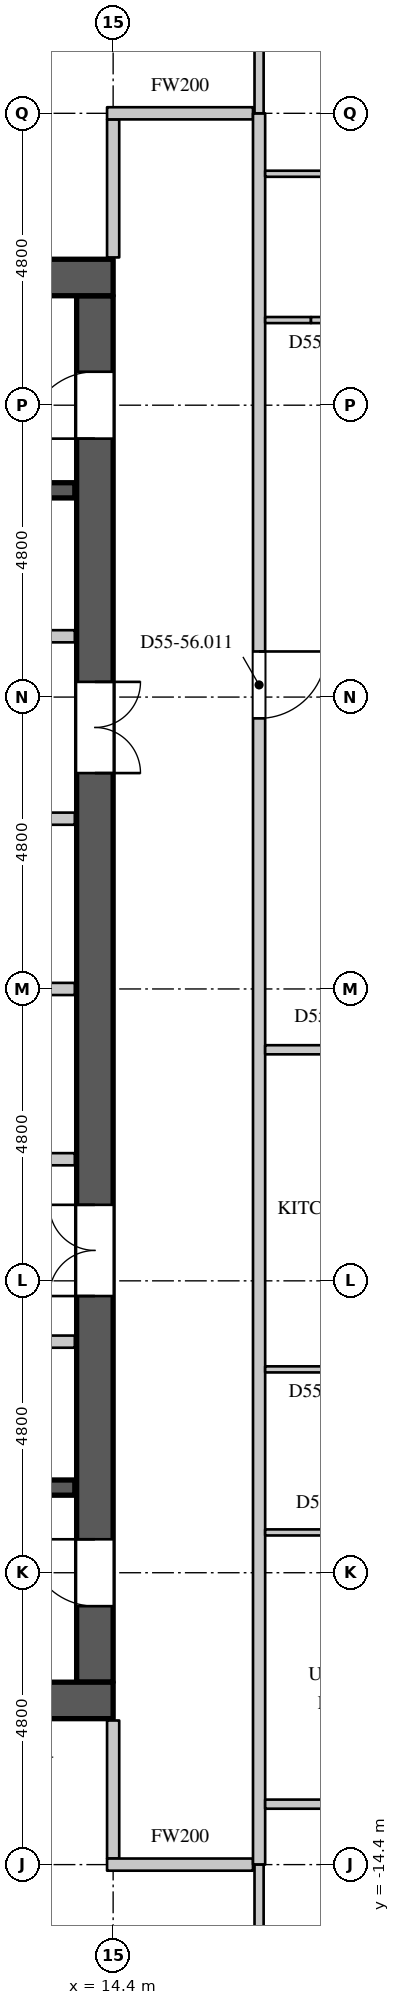
"""IFC4 building model, lengths in metres.
Left out: names, types, materials, properties, quantities, classifications, styles, units other than length and angle.
Written with IfcOpenShell. Run it as: python <this file> out.ifc"""

import sys

from ifc_helpers import new_model, si_unit, direction, frame, frame_2d, origin, place, context, subcontext, project, spatial, rectangle, extrude, element, fill, save


model = new_model("IFC4")
c1 = context("Model", 3, precision=1e-05, world=origin(), true_north=direction((0.0, 1.0)))
c2 = subcontext(c1, "Body", "Model", "MODEL_VIEW")
j1 = project(units=[si_unit("LENGTHUNIT", "METRE"), si_unit("PLANEANGLEUNIT", "RADIAN")], contexts=[c1])
p1 = place(None, origin())
s1 = spatial("IfcSite", under=j1, at=p1, CompositionType="ELEMENT")
p2 = place(p1, origin())
s2 = spatial("IfcBuilding", under=s1, at=p2, CompositionType="ELEMENT")
p3 = place(p2, frame((0.0, 0.0, 239.1)))
s3 = spatial("IfcBuildingStorey", under=s2, at=p3, CompositionType="ELEMENT", Elevation=239.1)
for number, where, z_axis, x_axis in (
    (1, (-14.4, 11.7, 0.0), (0.0, 0.0, 1.0), (1.0, 0.0, 0.0)),
    (2, (-14.4, -11.7, 0.0), (0.0, 0.0, 1.0), (1.0, 0.0, 0.0)),
):
    element("IfcWall", number, at=place(p3, frame(where, z_axis=z_axis, x_axis=x_axis)), inside=s3, PredefinedType="SHEAR", context=c2, shape_type="SweptSolid", body=[
        extrude(rectangle(XDim=28.8, YDim=0.6, at=frame_2d((14.4, 0.0))), origin(), (0.0, 0.0, 1.0), 4.2),
    ])
p4 = place(p3, frame((14.1, -11.4, 0.0), z_axis=(0.0, 0.0, 1.0), x_axis=(0.0, 1.0, 0.0)))
e3 = element("IfcWall", 3, at=p4, inside=s3, PredefinedType="SHEAR", context=c2, shape_type="SweptSolid", body=[
    extrude(rectangle(XDim=22.8, YDim=0.6, at=frame_2d((11.4, 0.0))), origin(), (0.0, 0.0, 1.0), 4.2),
])
p5 = place(p4, frame((20.45, 0.0, 0.0)))
e4 = element("IfcOpeningElement", 4, at=p5, cuts=e3, PredefinedType="OPENING", context=c2, shape_type="SweptSolid", body=[
    extrude(rectangle(XDim=1.1, YDim=2.2, at=frame_2d((0.55, 1.1))), frame((0.0, 0.31, 0.0), z_axis=(0.0, -1.0, 0.0), x_axis=(1.0, 0.0, 0.0)), (0.0, 0.0, 1.0), 0.62),
])
p6 = place(p4, frame((1.25, 0.0, 0.0)))
e5 = element("IfcOpeningElement", 5, at=p6, cuts=e3, PredefinedType="OPENING", context=c2, shape_type="SweptSolid", body=[
    extrude(rectangle(XDim=1.1, YDim=2.2, at=frame_2d((0.55, 1.1))), frame((0.0, 0.31, 0.0), z_axis=(0.0, -1.0, 0.0), x_axis=(1.0, 0.0, 0.0)), (0.0, 0.0, 1.0), 0.62),
])
p7 = place(p4, frame((14.95, 0.0, 0.0)))
e6 = element("IfcOpeningElement", 6, at=p7, cuts=e3, PredefinedType="OPENING", context=c2, shape_type="SweptSolid", body=[
    extrude(rectangle(XDim=1.5, YDim=2.4, at=frame_2d((0.75, 1.2))), frame((0.0, 0.31, 0.0), z_axis=(0.0, -1.0, 0.0), x_axis=(1.0, 0.0, 0.0)), (0.0, 0.0, 1.0), 0.62),
])
p8 = place(p4, frame((6.35, 0.0, 0.0)))
e7 = element("IfcOpeningElement", 7, at=p8, cuts=e3, PredefinedType="OPENING", context=c2, shape_type="SweptSolid", body=[
    extrude(rectangle(XDim=1.5, YDim=2.4, at=frame_2d((0.75, 1.2))), frame((0.0, 0.31, 0.0), z_axis=(0.0, -1.0, 0.0), x_axis=(1.0, 0.0, 0.0)), (0.0, 0.0, 1.0), 0.62),
])
p9 = place(p3, frame((9.22, 5.8, 0.0), z_axis=(0.0, 0.0, 1.0), x_axis=(1.0, 0.0, 0.0)))
e8 = element("IfcWall", 8, at=p9, inside=s3, PredefinedType="PARTITIONING", context=c2, shape_type="SweptSolid", body=[
    extrude(rectangle(XDim=4.55, YDim=0.2, at=frame_2d((2.275, 0.0))), origin(), (0.0, 0.0, 1.0), 3.95),
])
p10 = place(p9, frame((1.8, 0.0, 0.0)))
e9 = element("IfcOpeningElement", 9, at=p10, cuts=e8, PredefinedType="OPENING", context=c2, shape_type="SweptSolid", body=[
    extrude(rectangle(XDim=0.9, YDim=2.2, at=frame_2d((0.45, 1.1))), frame((0.0, 0.11, 0.0), z_axis=(0.0, -1.0, 0.0), x_axis=(1.0, 0.0, 0.0)), (0.0, 0.0, 1.0), 0.22),
])
p11 = place(p3, frame((14.4, -14.3, 0.0), z_axis=(0.0, 0.0, 1.0), x_axis=(0.0, 1.0, 0.0)))
e10 = element("IfcWall", 10, at=p11, inside=s3, PredefinedType="PARTITIONING", context=c2, shape_type="SweptSolid", body=[
    extrude(rectangle(XDim=2.27, YDim=0.2, at=frame_2d((1.135, 0.0))), origin(), (0.0, 0.0, 1.0), 3.95),
])
p12 = place(p3, frame((14.3, -14.4, 0.0), z_axis=(0.0, 0.0, 1.0), x_axis=(1.0, 0.0, 0.0)))
e11 = element("IfcWall", 11, at=p12, inside=s3, PredefinedType="PARTITIONING", context=c2, shape_type="SweptSolid", body=[
    extrude(rectangle(XDim=2.4, YDim=0.2, at=frame_2d((1.2, 0.0))), origin(), (0.0, 0.0, 1.0), 3.95),
])
p13 = place(p3, frame((14.4, 12.03, 0.0), z_axis=(0.0, 0.0, 1.0), x_axis=(0.0, 1.0, 0.0)))
e12 = element("IfcWall", 12, at=p13, inside=s3, PredefinedType="PARTITIONING", context=c2, shape_type="SweptSolid", body=[
    extrude(rectangle(XDim=2.27, YDim=0.2, at=frame_2d((1.135, 0.0))), origin(), (0.0, 0.0, 1.0), 3.95),
])
p14 = place(p3, frame((14.3, 14.4, 0.0), z_axis=(0.0, 0.0, 1.0), x_axis=(1.0, 0.0, 0.0)))
e13 = element("IfcWall", 13, at=p14, inside=s3, PredefinedType="PARTITIONING", context=c2, shape_type="SweptSolid", body=[
    extrude(rectangle(XDim=2.4, YDim=0.2, at=frame_2d((1.2, 0.0))), origin(), (0.0, 0.0, 1.0), 3.95),
])
p15 = place(p3, frame((16.8, -14.4, 0.0), z_axis=(0.0, 0.0, 1.0), x_axis=(0.0, 1.0, 0.0)))
e14 = element("IfcWall", 14, at=p15, inside=s3, PredefinedType="PARTITIONING", context=c2, shape_type="SweptSolid", body=[
    extrude(rectangle(XDim=28.8, YDim=0.2, at=frame_2d((14.4, 0.0))), origin(), (0.0, 0.0, 1.0), 3.95),
])
p16 = place(p15, frame((18.85, 0.0, 0.0)))
e15 = element("IfcOpeningElement", 15, at=p16, cuts=e14, PredefinedType="OPENING", context=c2, shape_type="SweptSolid", body=[
    extrude(rectangle(XDim=1.1, YDim=2.4, at=frame_2d((0.55, 1.2))), frame((0.0, 0.11, 0.0), z_axis=(0.0, -1.0, 0.0), x_axis=(1.0, 0.0, 0.0)), (0.0, 0.0, 1.0), 0.22),
])
p17 = place(p3, frame((16.8, -19.828, 0.0), z_axis=(0.0, 0.0, 1.0), x_axis=(0.0, 1.0, 0.0)))
e16 = element("IfcWall", 16, at=p17, inside=s3, PredefinedType="PARTITIONING", context=c2, shape_type="SweptSolid", body=[
    extrude(rectangle(XDim=5.428, YDim=0.15, at=frame_2d((2.714, 0.0))), origin(), (0.0, 0.0, 1.0), 3.95),
])
p18 = place(p17, frame((3.3, 0.0, 0.0)))
e17 = element("IfcOpeningElement", 17, at=p18, cuts=e16, PredefinedType="OPENING", context=c2, shape_type="SweptSolid", body=[
    extrude(rectangle(XDim=0.95, YDim=2.2, at=frame_2d((0.475, 1.1))), frame((0.0, 0.085, 0.0), z_axis=(0.0, -1.0, 0.0), x_axis=(1.0, 0.0, 0.0)), (0.0, 0.0, 1.0), 0.17),
])
p19 = place(p3, frame((16.9, -13.406, 0.0), z_axis=(0.0, 0.0, 1.0), x_axis=(1.0, 0.0, 0.0)))
e18 = element("IfcWall", 18, at=p19, inside=s3, PredefinedType="PARTITIONING", context=c2, shape_type="SweptSolid", body=[
    extrude(rectangle(XDim=8.324, YDim=0.15, at=frame_2d((4.162, 0.0))), origin(), (0.0, 0.0, 1.0), 3.95),
])
p20 = place(p19, frame((4.95, 0.0, 0.0)))
e19 = element("IfcOpeningElement", 19, at=p20, cuts=e18, PredefinedType="OPENING", context=c2, shape_type="SweptSolid", body=[
    extrude(rectangle(XDim=1.5, YDim=2.2, at=frame_2d((0.75, 1.1))), frame((0.0, 0.085, 0.0), z_axis=(0.0, -1.0, 0.0), x_axis=(1.0, 0.0, 0.0)), (0.0, 0.0, 1.0), 0.17),
])
p21 = place(p3, frame((16.9, -1.0, 0.0), z_axis=(0.0, 0.0, 1.0), x_axis=(1.0, 0.0, 0.0)))
e20 = element("IfcWall", 20, at=p21, inside=s3, PredefinedType="PARTITIONING", context=c2, shape_type="SweptSolid", body=[
    extrude(rectangle(XDim=3.625, YDim=0.15, at=frame_2d((1.812, 0.0))), origin(), (0.0, 0.0, 1.0), 3.95),
])
p22 = place(p21, frame((1.3, 0.0, 0.0)))
e21 = element("IfcOpeningElement", 21, at=p22, cuts=e20, PredefinedType="OPENING", context=c2, shape_type="SweptSolid", body=[
    extrude(rectangle(XDim=0.95, YDim=2.2, at=frame_2d((0.475, 1.1))), frame((0.0, 0.085, 0.0), z_axis=(0.0, -1.0, 0.0), x_axis=(1.0, 0.0, 0.0)), (0.0, 0.0, 1.0), 0.17),
])
p23 = place(p3, frame((16.8, 14.4, 0.0), z_axis=(0.0, 0.0, 1.0), x_axis=(0.0, 1.0, 0.0)))
e22 = element("IfcWall", 22, at=p23, inside=s3, PredefinedType="PARTITIONING", context=c2, shape_type="SweptSolid", body=[
    extrude(rectangle(XDim=5.428, YDim=0.15, at=frame_2d((2.714, 0.0))), origin(), (0.0, 0.0, 1.0), 3.95),
])
p24 = place(p23, frame((1.2, 0.0, 0.0)))
e23 = element("IfcOpeningElement", 23, at=p24, cuts=e22, PredefinedType="OPENING", context=c2, shape_type="SweptSolid", body=[
    extrude(rectangle(XDim=0.95, YDim=2.2, at=frame_2d((0.475, 1.1))), frame((0.0, 0.085, 0.0), z_axis=(0.0, -1.0, 0.0), x_axis=(1.0, 0.0, 0.0)), (0.0, 0.0, 1.0), 0.17),
])
p25 = place(p3, frame((5.42, -5.8, 0.0), z_axis=(0.0, 0.0, 1.0), x_axis=(1.0, 0.0, 0.0)))
e24 = element("IfcWall", 24, at=p25, inside=s3, PredefinedType="PARTITIONING", context=c2, shape_type="SweptSolid", body=[
    extrude(rectangle(XDim=8.35, YDim=0.2, at=frame_2d((4.175, 0.0))), origin(), (0.0, 0.0, 1.0), 3.95),
])
p26 = place(p25, frame((3.75, 0.0, 0.0)))
e25 = element("IfcOpeningElement", 25, at=p26, cuts=e24, PredefinedType="OPENING", context=c2, shape_type="SweptSolid", body=[
    extrude(rectangle(XDim=0.9, YDim=2.2, at=frame_2d((0.45, 1.1))), frame((0.0, 0.11, 0.0), z_axis=(0.0, -1.0, 0.0), x_axis=(1.0, 0.0, 0.0)), (0.0, 0.0, 1.0), 0.22),
])
p27 = place(p3, frame((7.8, -2.8, 0.0), z_axis=(0.0, 0.0, 1.0), x_axis=(1.0, 0.0, 0.0)))
e26 = element("IfcWall", 26, at=p27, inside=s3, PredefinedType="PARTITIONING", context=c2, shape_type="SweptSolid", body=[
    extrude(rectangle(XDim=5.97, YDim=0.2, at=frame_2d((2.985, 0.0))), origin(), (0.0, 0.0, 1.0), 3.95),
])
p28 = place(p27, frame((2.55, 0.0, 0.0)))
e27 = element("IfcOpeningElement", 27, at=p28, cuts=e26, PredefinedType="OPENING", context=c2, shape_type="SweptSolid", body=[
    extrude(rectangle(XDim=0.9, YDim=2.2, at=frame_2d((0.45, 1.1))), frame((0.0, 0.11, 0.0), z_axis=(0.0, -1.0, 0.0), x_axis=(1.0, 0.0, 0.0)), (0.0, 0.0, 1.0), 0.22),
])
p29 = place(p3, frame((7.8, 0.0, 0.0), z_axis=(0.0, 0.0, 1.0), x_axis=(1.0, 0.0, 0.0)))
e28 = element("IfcWall", 28, at=p29, inside=s3, PredefinedType="PARTITIONING", context=c2, shape_type="SweptSolid", body=[
    extrude(rectangle(XDim=5.97, YDim=0.2, at=frame_2d((2.985, 0.0))), origin(), (0.0, 0.0, 1.0), 3.95),
])
p30 = place(p3, frame((10.42, 2.8, 0.0), z_axis=(0.0, 0.0, 1.0), x_axis=(1.0, 0.0, 0.0)))
e29 = element("IfcWall", 29, at=p30, inside=s3, PredefinedType="PARTITIONING", context=c2, shape_type="SweptSolid", body=[
    extrude(rectangle(XDim=3.35, YDim=0.2, at=frame_2d((1.675, 0.0))), origin(), (0.0, 0.0, 1.0), 3.95),
])
p31 = place(p30, frame((1.35, 0.0, 0.0)))
e30 = element("IfcOpeningElement", 30, at=p31, cuts=e29, PredefinedType="OPENING", context=c2, shape_type="SweptSolid", body=[
    extrude(rectangle(XDim=0.6, YDim=2.0, at=frame_2d((0.3, 1.0))), frame((0.0, 0.11, 0.0), z_axis=(0.0, -1.0, 0.0), x_axis=(1.0, 0.0, 0.0)), (0.0, 0.0, 1.0), 0.22),
])
p32 = place(p3, frame((5.525, -8.2, 0.0), z_axis=(0.0, 0.0, 1.0), x_axis=(1.0, 0.0, 0.0)))
e31 = element("IfcWall", 31, at=p32, inside=s3, PredefinedType="SHEAR", context=c2, shape_type="SweptSolid", body=[
    extrude(rectangle(XDim=8.245, YDim=0.25, at=frame_2d((4.123, 0.0))), origin(), (0.0, 0.0, 1.0), 3.95),
])
p33 = place(p3, frame((5.275, 8.2, 0.0), z_axis=(0.0, 0.0, 1.0), x_axis=(1.0, 0.0, 0.0)))
e32 = element("IfcWall", 32, at=p33, inside=s3, PredefinedType="SHEAR", context=c2, shape_type="SweptSolid", body=[
    extrude(rectangle(XDim=8.495, YDim=0.25, at=frame_2d((4.248, 0.0))), origin(), (0.0, 0.0, 1.0), 3.95),
])
p34 = place(p3, frame((16.9, -8.937, 0.0), z_axis=(0.0, 0.0, 1.0), x_axis=(1.0, 0.0, 0.0)))
e33 = element("IfcWall", 33, at=p34, inside=s3, PredefinedType="PARTITIONING", context=c2, shape_type="SweptSolid", body=[
    extrude(rectangle(XDim=3.68, YDim=0.1, at=frame_2d((1.84, 0.0))), origin(), (0.0, 0.0, 1.0), 3.95),
])
p35 = place(p34, frame((0.95, 0.0, 0.0)))
e34 = element("IfcOpeningElement", 34, at=p35, cuts=e33, PredefinedType="OPENING", context=c2, shape_type="SweptSolid", body=[
    extrude(rectangle(XDim=0.9, YDim=2.2, at=frame_2d((0.45, 1.1))), frame((0.0, 0.06, 0.0), z_axis=(0.0, -1.0, 0.0), x_axis=(1.0, 0.0, 0.0)), (0.0, 0.0, 1.0), 0.12),
])
p36 = place(p3, frame((16.9, -6.256, 0.0), z_axis=(0.0, 0.0, 1.0), x_axis=(1.0, 0.0, 0.0)))
e35 = element("IfcWall", 35, at=p36, inside=s3, PredefinedType="PARTITIONING", context=c2, shape_type="SweptSolid", body=[
    extrude(rectangle(XDim=3.625, YDim=0.1, at=frame_2d((1.812, 0.0))), origin(), (0.0, 0.0, 1.0), 3.95),
])
p37 = place(p36, frame((1.35, 0.0, 0.0)))
e36 = element("IfcOpeningElement", 36, at=p37, cuts=e35, PredefinedType="OPENING", context=c2, shape_type="SweptSolid", body=[
    extrude(rectangle(XDim=0.9, YDim=2.2, at=frame_2d((0.45, 1.1))), frame((0.0, 0.06, 0.0), z_axis=(0.0, -1.0, 0.0), x_axis=(1.0, 0.0, 0.0)), (0.0, 0.0, 1.0), 0.12),
])
p38 = place(p3, frame((16.9, 11.0, 0.0), z_axis=(0.0, 0.0, 1.0), x_axis=(1.0, 0.0, 0.0)))
e37 = element("IfcWall", 37, at=p38, inside=s3, PredefinedType="PARTITIONING", context=c2, shape_type="SweptSolid", body=[
    extrude(rectangle(XDim=0.754, YDim=0.1, at=frame_2d((0.377, 0.0))), origin(), (0.0, 0.0, 1.0), 3.35),
])
p39 = place(p3, frame((17.654, 11.0, 0.0), z_axis=(0.0, 0.0, 1.0), x_axis=(1.0, 0.0, 0.0)))
e38 = element("IfcWall", 38, at=p39, inside=s3, PredefinedType="PARTITIONING", context=c2, shape_type="SweptSolid", body=[
    extrude(rectangle(XDim=2.871, YDim=0.1, at=frame_2d((1.436, 0.0))), origin(), (0.0, 0.0, 1.0), 3.95),
])
p40 = place(p39, frame((0.596, 0.0, 0.0)))
e39 = element("IfcOpeningElement", 39, at=p40, cuts=e38, PredefinedType="OPENING", context=c2, shape_type="SweptSolid", body=[
    extrude(rectangle(XDim=0.9, YDim=2.2, at=frame_2d((0.45, 1.1))), frame((0.0, 0.06, 0.0), z_axis=(0.0, -1.0, 0.0), x_axis=(1.0, 0.0, 0.0)), (0.0, 0.0, 1.0), 0.12),
])
p41 = place(p3, frame((16.9, 13.406, 0.0), z_axis=(0.0, 0.0, 1.0), x_axis=(1.0, 0.0, 0.0)))
e40 = element("IfcWall", 40, at=p41, inside=s3, PredefinedType="PARTITIONING", context=c2, shape_type="SweptSolid", body=[
    extrude(rectangle(XDim=3.7, YDim=0.1, at=frame_2d((1.85, 0.0))), origin(), (0.0, 0.0, 1.0), 3.95),
])
p42 = place(p5, origin())
e41 = element("IfcDoor", 41, at=p42, inside=s3, OperationType="SINGLE_SWING_LEFT", PredefinedType="DOOR", context=c2, shape_type="SweptSolid", body=[
    extrude(rectangle(XDim=1.1, YDim=2.2, at=frame_2d((0.55, 1.1))), frame((0.0, 0.295, 0.0), z_axis=(0.0, -1.0, 0.0), x_axis=(1.0, 0.0, 0.0)), (0.0, 0.0, 1.0), 0.05),
])
fill(e4, e41)
p43 = place(p6, origin())
e42 = element("IfcDoor", 42, at=p43, inside=s3, OperationType="SINGLE_SWING_RIGHT", PredefinedType="DOOR", context=c2, shape_type="SweptSolid", body=[
    extrude(rectangle(XDim=1.1, YDim=2.2, at=frame_2d((0.55, 1.1))), frame((0.0, 0.295, 0.0), z_axis=(0.0, -1.0, 0.0), x_axis=(1.0, 0.0, 0.0)), (0.0, 0.0, 1.0), 0.05),
])
fill(e5, e42)
p44 = place(p7, origin())
e43 = element("IfcDoor", 43, at=p44, inside=s3, OperationType="DOUBLE_DOOR_SINGLE_SWING", PredefinedType="DOOR", context=c2, shape_type="SweptSolid", body=[
    extrude(rectangle(XDim=1.5, YDim=2.4, at=frame_2d((0.75, 1.2))), frame((0.0, -0.245, 0.0), z_axis=(0.0, -1.0, 0.0), x_axis=(1.0, 0.0, 0.0)), (0.0, 0.0, 1.0), 0.05),
])
fill(e6, e43)
p45 = place(p8, origin())
e44 = element("IfcDoor", 44, at=p45, inside=s3, OperationType="DOUBLE_DOOR_SINGLE_SWING", PredefinedType="DOOR", context=c2, shape_type="SweptSolid", body=[
    extrude(rectangle(XDim=1.5, YDim=2.4, at=frame_2d((0.75, 1.2))), frame((0.0, 0.295, 0.0), z_axis=(0.0, -1.0, 0.0), x_axis=(1.0, 0.0, 0.0)), (0.0, 0.0, 1.0), 0.05),
])
fill(e7, e44)
p46 = place(p16, origin())
e45 = element("IfcDoor", 45, at=p46, inside=s3, OperationType="SINGLE_SWING_LEFT", PredefinedType="DOOR", context=c2, shape_type="SweptSolid", body=[
    extrude(rectangle(XDim=1.1, YDim=2.4, at=frame_2d((0.55, 1.2))), frame((0.0, 0.025, 0.0), z_axis=(0.0, -1.0, 0.0), x_axis=(1.0, 0.0, 0.0)), (0.0, 0.0, 1.0), 0.05),
])
fill(e15, e45)
save(model, sys.argv[1])
